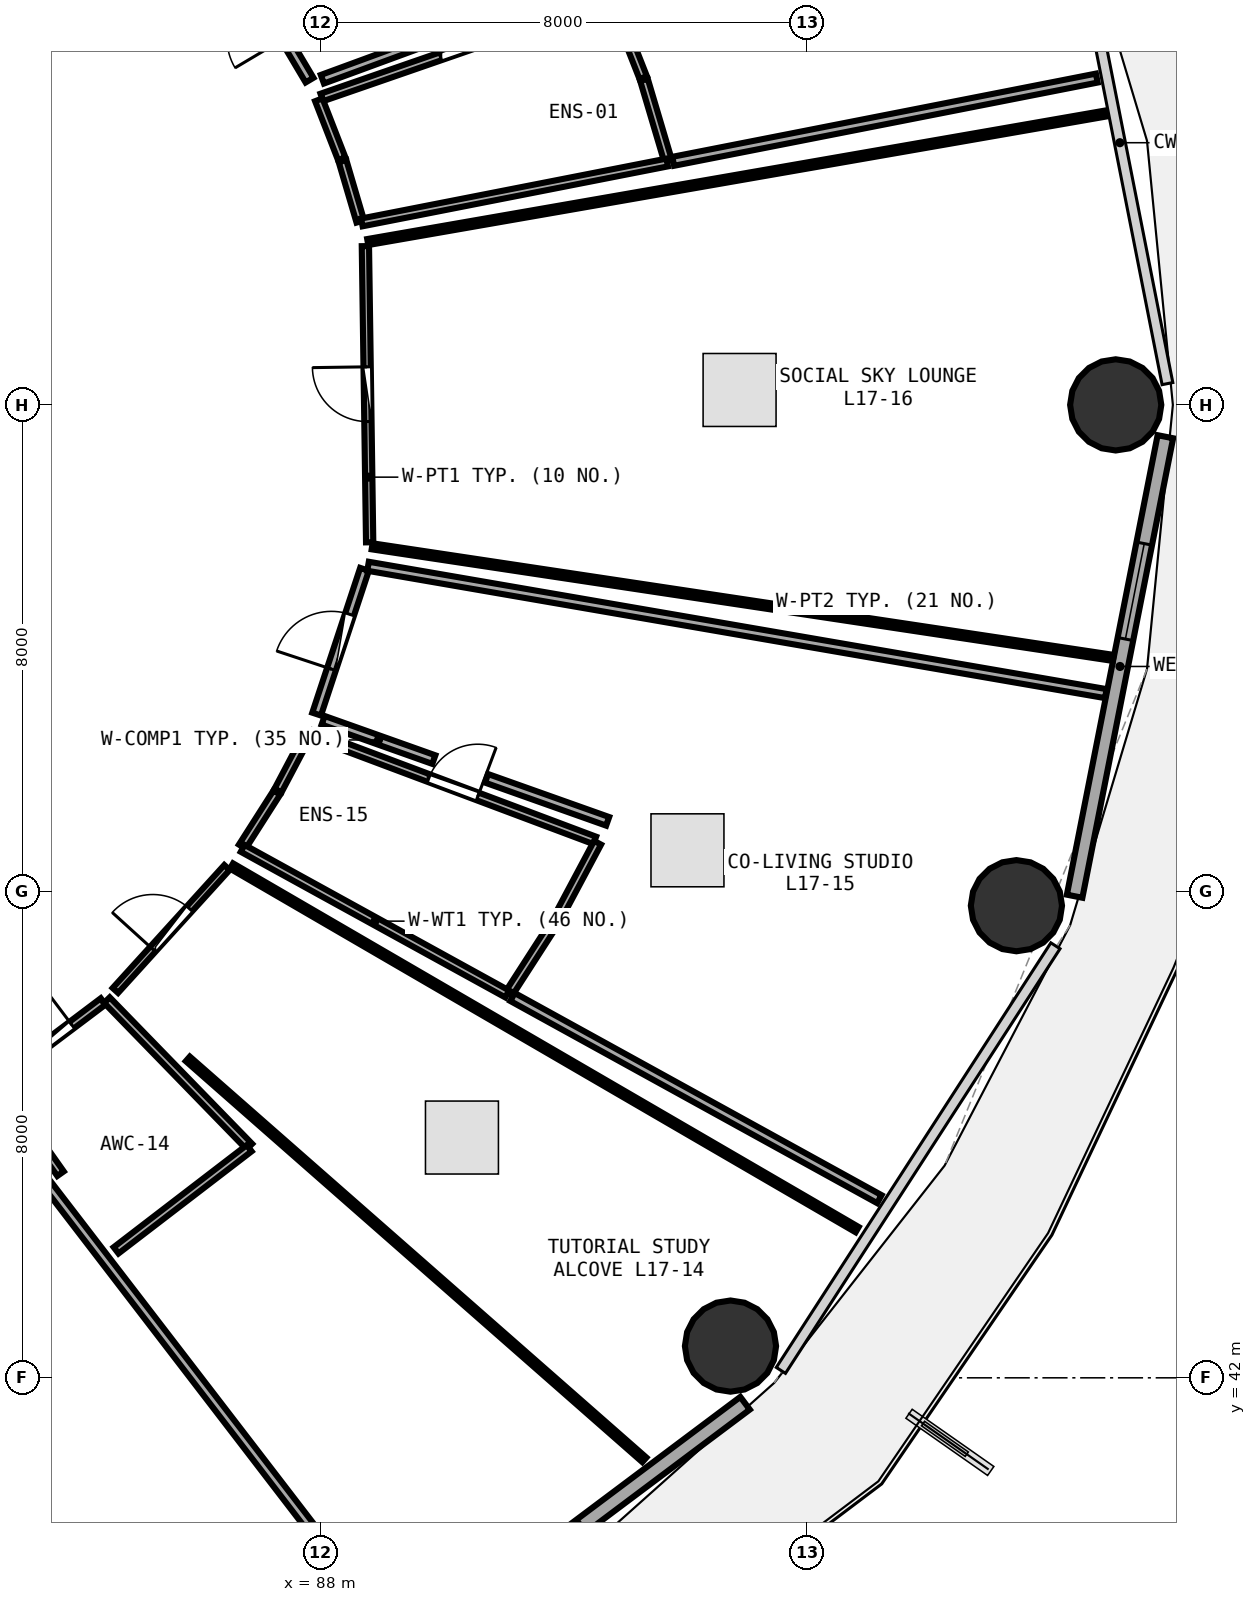
"""IFC4 building model, lengths in metres.
Left out: names, types, materials, properties, quantities, classifications, styles, units other than length and angle.
Written with IfcOpenShell. Run it as: python <this file> out.ifc"""

import sys

from ifc_helpers import new_model, si_unit, direction, frame, frame_2d, origin, origin_2d, place, context, subcontext, project, spatial, rectangle, circle, extrude, element, fill, save


model = new_model("IFC4")
c1 = context("Model", 3, precision=1e-05, world=origin(), true_north=direction((0.0, 1.0)))
c2 = subcontext(c1, "Body", "Model", "MODEL_VIEW")
j1 = project(units=[si_unit("LENGTHUNIT", "METRE"), si_unit("PLANEANGLEUNIT", "RADIAN")], contexts=[c1])
p1 = place(None, origin())
s1 = spatial("IfcSite", under=j1, at=p1, CompositionType="ELEMENT")
p2 = place(p1, origin())
s2 = spatial("IfcBuilding", under=s1, at=p2, CompositionType="ELEMENT")
p3 = place(p2, frame((0.0, 0.0, 67.5)))
s3 = spatial("IfcBuildingStorey", under=s2, at=p3, CompositionType="ELEMENT", Elevation=67.5)
for number, where, z_axis, x_axis in (
    (1, (101.08, 58.0, 0.0), (0.0, 0.0, 1.0), (1.0, 0.0, 0.0)),
    (2, (94.744, 42.522, 0.0), (0.0, 0.0, 1.0), (1.0, 0.0, 0.0)),
    (3, (99.447, 49.764, 0.0), (0.0, 0.0, 1.0), (1.0, 0.0, 0.0)),
):
    element("IfcColumn", number, at=place(p3, frame(where, z_axis=z_axis, x_axis=x_axis)), inside=s3, PredefinedType="COLUMN", context=c2, shape_type="SweptSolid", body=[
        extrude(circle(Radius=0.75, at=origin_2d()), origin(), (0.0, 0.0, 1.0), 4.76),
    ])
p4 = place(p3, frame((88.349, 36.611, 0.0), z_axis=(0.0, 0.0, 1.0), x_axis=(0.80030733173, 0.599590005569, 0.0)))
e4 = element("IfcWall", 4, at=p4, inside=s3, PredefinedType="SOLIDWALL", context=c2, shape_type="SweptSolid", body=[
    extrude(rectangle(XDim=8.291, YDim=0.26, at=frame_2d((4.145, 0.0))), origin(), (0.0, 0.0, 1.0), 4.345),
])
p5 = place(p4, frame((3.345, 0.0, 0.85)))
e5 = element("IfcOpeningElement", 5, at=p5, cuts=e4, PredefinedType="OPENING", context=c2, shape_type="SweptSolid", body=[
    extrude(rectangle(XDim=1.6, YDim=1.45, at=frame_2d((0.8, 0.725))), frame((0.0, 0.14, 0.0), z_axis=(0.0, -1.0, 0.0), x_axis=(1.0, 0.0, 0.0)), (0.0, 0.0, 1.0), 0.28),
])
p6 = place(p3, frame((100.404, 49.92, 0.0), z_axis=(0.0, 0.0, 1.0), x_axis=(0.193726159581, 0.98105564322, 0.0)))
e6 = element("IfcWall", 6, at=p6, inside=s3, PredefinedType="SOLIDWALL", context=c2, shape_type="SweptSolid", body=[
    extrude(rectangle(XDim=7.703, YDim=0.26, at=frame_2d((3.851, 0.0))), origin(), (0.0, 0.0, 1.0), 4.345),
])
p7 = place(p6, frame((4.311, 0.0, 0.85)))
e7 = element("IfcOpeningElement", 7, at=p7, cuts=e6, PredefinedType="OPENING", context=c2, shape_type="SweptSolid", body=[
    extrude(rectangle(XDim=1.6, YDim=1.45, at=frame_2d((0.8, 0.725))), frame((0.0, 0.14, 0.0), z_axis=(0.0, -1.0, 0.0), x_axis=(1.0, 0.0, 0.0)), (0.0, 0.0, 1.0), 0.28),
])
p8 = place(p3, frame((88.023, 63.056, 0.0), z_axis=(0.0, 0.0, 1.0), x_axis=(0.945000053877, 0.327070173163, 0.0)))
e8 = element("IfcWall", 8, at=p8, inside=s3, PredefinedType="PLUMBINGWALL", context=c2, shape_type="SweptSolid", body=[
    extrude(rectangle(XDim=4.982, YDim=0.13, at=frame_2d((2.491, 0.0))), origin(), (0.0, 0.0, 1.0), 4.045),
])
p9 = place(p8, frame((2.061, 0.0, 0.0)))
e9 = element("IfcOpeningElement", 9, at=p9, cuts=e8, PredefinedType="OPENING", context=c2, shape_type="SweptSolid", body=[
    extrude(rectangle(XDim=0.86, YDim=2.05, at=frame_2d((0.43, 1.025))), frame((0.0, 0.075, 0.0), z_axis=(0.0, -1.0, 0.0), x_axis=(1.0, 0.0, 0.0)), (0.0, 0.0, 1.0), 0.15),
])
p10 = place(p3, frame((87.821, 63.341, 0.0), z_axis=(0.0, 0.0, 1.0), x_axis=(-0.510684908265, 0.859767948036, 0.0)))
e10 = element("IfcWall", 10, at=p10, inside=s3, PredefinedType="PARTITIONING", context=c2, shape_type="SweptSolid", body=[
    extrude(rectangle(XDim=2.547, YDim=0.15, at=frame_2d((1.273, 0.0))), origin(), (0.0, 0.0, 1.0), 2.345),
])
p11 = place(p10, frame((0.799, 0.0, 0.0)))
e11 = element("IfcOpeningElement", 11, at=p11, cuts=e10, PredefinedType="OPENING", context=c2, shape_type="SweptSolid", body=[
    extrude(rectangle(XDim=0.95, YDim=2.08, at=frame_2d((0.475, 1.04))), frame((0.0, 0.085, 0.0), z_axis=(0.0, -1.0, 0.0), x_axis=(1.0, 0.0, 0.0)), (0.0, 0.0, 1.0), 0.17),
])
p12 = place(p3, frame((82.712, 46.898, 0.0), z_axis=(0.0, 0.0, 1.0), x_axis=(0.798783982359, 0.601617943155, 0.0)))
e12 = element("IfcWall", 12, at=p12, inside=s3, PredefinedType="PLUMBINGWALL", context=c2, shape_type="SweptSolid", body=[
    extrude(rectangle(XDim=2.147, YDim=0.13, at=frame_2d((1.074, 0.0))), origin(), (0.0, 0.0, 1.0), 2.345),
])
p13 = place(p12, frame((0.644, 0.0, 0.0)))
e13 = element("IfcOpeningElement", 13, at=p13, cuts=e12, PredefinedType="OPENING", context=c2, shape_type="SweptSolid", body=[
    extrude(rectangle(XDim=0.86, YDim=2.05, at=frame_2d((0.43, 1.025))), frame((0.0, 0.075, 0.0), z_axis=(0.0, -1.0, 0.0), x_axis=(1.0, 0.0, 0.0)), (0.0, 0.0, 1.0), 0.15),
])
p14 = place(p3, frame((84.628, 48.37, 0.0), z_axis=(0.0, 0.0, 1.0), x_axis=(0.672036212067, 0.740518284495, 0.0)))
e14 = element("IfcWall", 14, at=p14, inside=s3, PredefinedType="PARTITIONING", context=c2, shape_type="SweptSolid", body=[
    extrude(rectangle(XDim=2.731, YDim=0.12, at=frame_2d((1.365, 0.0))), origin(), (0.0, 0.0, 1.0), 2.345),
])
p15 = place(p14, frame((0.915, 0.0, 0.0)))
e15 = element("IfcOpeningElement", 15, at=p15, cuts=e14, PredefinedType="OPENING", context=c2, shape_type="SweptSolid", body=[
    extrude(rectangle(XDim=0.9, YDim=2.08, at=frame_2d((0.45, 1.04))), frame((0.0, 0.07, 0.0), z_axis=(0.0, -1.0, 0.0), x_axis=(1.0, 0.0, 0.0)), (0.0, 0.0, 1.0), 0.14),
])
p16 = place(p3, frame((87.859, 52.584, 0.0), z_axis=(0.0, 0.0, 1.0), x_axis=(0.93625445313, -0.351322642301, 0.0)))
e16 = element("IfcWall", 16, at=p16, inside=s3, PredefinedType="PLUMBINGWALL", context=c2, shape_type="SweptSolid", body=[
    extrude(rectangle(XDim=4.969, YDim=0.13, at=frame_2d((2.485, 0.0))), origin(), (0.0, 0.0, 1.0), 2.345),
])
p17 = place(p16, frame((2.055, 0.0, 0.0)))
e17 = element("IfcOpeningElement", 17, at=p17, cuts=e16, PredefinedType="OPENING", context=c2, shape_type="SweptSolid", body=[
    extrude(rectangle(XDim=0.86, YDim=2.05, at=frame_2d((0.43, 1.025))), frame((0.0, 0.075, 0.0), z_axis=(0.0, -1.0, 0.0), x_axis=(1.0, 0.0, 0.0)), (0.0, 0.0, 1.0), 0.15),
])
p18 = place(p3, frame((87.938, 52.915, 0.0), z_axis=(0.0, 0.0, 1.0), x_axis=(0.313977919329, 0.949430285052, 0.0)))
e18 = element("IfcWall", 18, at=p18, inside=s3, PredefinedType="PARTITIONING", context=c2, shape_type="SweptSolid", body=[
    extrude(rectangle(XDim=2.508, YDim=0.15, at=frame_2d((1.254, 0.0))), origin(), (0.0, 0.0, 1.0), 4.105),
])
p19 = place(p18, frame((0.779, 0.0, 0.0)))
e19 = element("IfcOpeningElement", 19, at=p19, cuts=e18, PredefinedType="OPENING", context=c2, shape_type="SweptSolid", body=[
    extrude(rectangle(XDim=0.95, YDim=2.08, at=frame_2d((0.475, 1.04))), frame((0.0, 0.085, 0.0), z_axis=(0.0, -1.0, 0.0), x_axis=(1.0, 0.0, 0.0)), (0.0, 0.0, 1.0), 0.17),
])
p20 = place(p3, frame((88.81, 55.74, 0.0), z_axis=(0.0, 0.0, 1.0), x_axis=(-0.014383034903, 0.999896558803, 0.0)))
e20 = element("IfcWall", 20, at=p20, inside=s3, PredefinedType="PARTITIONING", context=c2, shape_type="SweptSolid", body=[
    extrude(rectangle(XDim=4.872, YDim=0.12, at=frame_2d((2.436, 0.0))), origin(), (0.0, 0.0, 1.0), 2.345),
])
p21 = place(p20, frame((1.986, 0.0, 0.0)))
e21 = element("IfcOpeningElement", 21, at=p21, cuts=e20, PredefinedType="OPENING", context=c2, shape_type="SweptSolid", body=[
    extrude(rectangle(XDim=0.9, YDim=2.08, at=frame_2d((0.45, 1.04))), frame((0.0, 0.07, 0.0), z_axis=(0.0, -1.0, 0.0), x_axis=(1.0, 0.0, 0.0)), (0.0, 0.0, 1.0), 0.14),
])
p22 = place(p3, frame((88.656, 61.016, 0.0), z_axis=(0.0, 0.0, 1.0), x_axis=(-0.282370492218, 0.959305428487, 0.0)))
e22 = element("IfcWall", 22, at=p22, inside=s3, PredefinedType="PLUMBINGWALL", context=c2, shape_type="SweptSolid", body=[
    extrude(rectangle(XDim=1.036, YDim=0.13, at=frame_2d((0.518, 0.0))), origin(), (0.0, 0.0, 1.0), 4.35),
])
p23 = place(p3, frame((88.351, 62.048, 0.0), z_axis=(0.0, 0.0, 1.0), x_axis=(-0.362514197989, 0.931978248811, 0.0)))
e23 = element("IfcWall", 23, at=p23, inside=s3, PredefinedType="PLUMBINGWALL", context=c2, shape_type="SweptSolid", body=[
    extrude(rectangle(XDim=1.041, YDim=0.13, at=frame_2d((0.52, 0.0))), origin(), (0.0, 0.0, 1.0), 4.105),
])
p24 = place(p3, frame((92.795, 64.686, 0.0), z_axis=(0.0, 0.0, 1.0), x_axis=(0.366277671592, -0.930505597669, 0.0)))
e24 = element("IfcWall", 24, at=p24, inside=s3, PredefinedType="PLUMBINGWALL", context=c2, shape_type="SweptSolid", body=[
    extrude(rectangle(XDim=1.401, YDim=0.13, at=frame_2d((0.701, 0.0))), origin(), (0.0, 0.0, 1.0), 4.35),
])
p25 = place(p3, frame((93.322, 63.345, 0.0), z_axis=(0.0, 0.0, 1.0), x_axis=(0.284613387728, -0.958642383543, 0.0)))
e25 = element("IfcWall", 25, at=p25, inside=s3, PredefinedType="PLUMBINGWALL", context=c2, shape_type="SweptSolid", body=[
    extrude(rectangle(XDim=1.393, YDim=0.13, at=frame_2d((0.697, 0.0))), origin(), (0.0, 0.0, 1.0), 4.35),
])
p26 = place(p3, frame((93.704, 61.986, 0.0), z_axis=(0.0, 0.0, 1.0), x_axis=(-0.981295026007, -0.192509926844, 0.0)))
e26 = element("IfcWall", 26, at=p26, inside=s3, PredefinedType="PLUMBINGWALL", context=c2, shape_type="SweptSolid", body=[
    extrude(rectangle(XDim=5.118, YDim=0.13, at=frame_2d((2.559, 0.0))), origin(), (0.0, 0.0, 1.0), 4.045),
])
p27 = place(p3, frame((100.769, 63.374, 0.0), z_axis=(0.0, 0.0, 1.0), x_axis=(-0.98124289703, -0.192775457535, 0.0)))
e27 = element("IfcWall", 27, at=p27, inside=s3, PredefinedType="PARTITIONING", context=c2, shape_type="SweptSolid", body=[
    extrude(rectangle(XDim=7.1, YDim=0.15, at=frame_2d((3.55, 0.0))), origin(), (0.0, 0.0, 1.0), 2.345),
])
p28 = place(p3, frame((89.839, 64.018, 0.0), z_axis=(0.0, 0.0, 1.0), x_axis=(-0.938736795894, -0.344634919931, 0.0)))
e28 = element("IfcWall", 28, at=p28, inside=s3, PredefinedType="PARTITIONING", context=c2, shape_type="SweptSolid", body=[
    extrude(rectangle(XDim=1.924, YDim=0.15, at=frame_2d((0.962, 0.0))), origin(), (0.0, 0.0, 1.0), 4.105),
])
p29 = place(p3, frame((82.385, 46.642, 0.0), z_axis=(0.0, 0.0, 1.0), x_axis=(0.6091849282, -0.793028198271, 0.0)))
e29 = element("IfcWall", 29, at=p29, inside=s3, PredefinedType="PARTITIONING", context=c2, shape_type="SweptSolid", body=[
    extrude(rectangle(XDim=11.289, YDim=0.15, at=frame_2d((5.645, 0.0))), origin(), (0.0, 0.0, 1.0), 2.345),
])
p30 = place(p3, frame((84.489, 48.212, 0.0), z_axis=(0.0, 0.0, 1.0), x_axis=(0.697008873448, -0.717062500996, 0.0)))
e30 = element("IfcWall", 30, at=p30, inside=s3, PredefinedType="PLUMBINGWALL", context=c2, shape_type="SweptSolid", body=[
    extrude(rectangle(XDim=3.36, YDim=0.13, at=frame_2d((1.68, 0.0))), origin(), (0.0, 0.0, 1.0), 4.105),
])
p31 = place(p3, frame((86.829, 45.776, 0.0), z_axis=(0.0, 0.0, 1.0), x_axis=(-0.793379880103, -0.608726840092, 0.0)))
e31 = element("IfcWall", 31, at=p31, inside=s3, PredefinedType="PLUMBINGWALL", context=c2, shape_type="SweptSolid", body=[
    extrude(rectangle(XDim=2.759, YDim=0.13, at=frame_2d((1.38, 0.0))), origin(), (0.0, 0.0, 1.0), 2.345),
])
p32 = place(p3, frame((83.726, 45.357, 0.0), z_axis=(0.0, 0.0, 1.0), x_axis=(-0.576488563642, 0.817105217209, 0.0)))
e32 = element("IfcWall", 32, at=p32, inside=s3, PredefinedType="PLUMBINGWALL", context=c2, shape_type="SweptSolid", body=[
    extrude(rectangle(XDim=1.822, YDim=0.13, at=frame_2d((0.911, 0.0))), origin(), (0.0, 0.0, 1.0), 2.345),
])
p33 = place(p3, frame((86.539, 50.417, 0.0), z_axis=(0.0, 0.0, 1.0), x_axis=(0.864576212426, -0.502501714333, 0.0)))
e33 = element("IfcWall", 33, at=p33, inside=s3, PredefinedType="PARTITIONING", context=c2, shape_type="SweptSolid", body=[
    extrude(rectangle(XDim=11.9, YDim=0.1, at=frame_2d((5.95, 0.0))), origin(), (0.0, 0.0, 1.0), 2.345),
])
p34 = place(p3, frame((93.328, 40.651, 0.0), z_axis=(0.0, 0.0, 1.0), x_axis=(-0.751420724703, 0.659823381282, 0.0)))
e34 = element("IfcWall", 34, at=p34, inside=s3, PredefinedType="PARTITIONING", context=c2, shape_type="SweptSolid", body=[
    extrude(rectangle(XDim=9.992, YDim=0.1, at=frame_2d((4.996, 0.0))), origin(), (0.0, 0.0, 1.0), 2.345),
])
p35 = place(p3, frame((86.715, 50.734, 0.0), z_axis=(0.0, 0.0, 1.0), x_axis=(0.53816125517, 0.842841897057, 0.0)))
e35 = element("IfcWall", 35, at=p35, inside=s3, PredefinedType="PLUMBINGWALL", context=c2, shape_type="SweptSolid", body=[
    extrude(rectangle(XDim=1.056, YDim=0.13, at=frame_2d((0.528, 0.0))), origin(), (0.0, 0.0, 1.0), 2.345),
])
p36 = place(p3, frame((87.303, 51.659, 0.0), z_axis=(0.0, 0.0, 1.0), x_axis=(0.467001016817, 0.884256778482, 0.0)))
e36 = element("IfcWall", 36, at=p36, inside=s3, PredefinedType="PLUMBINGWALL", context=c2, shape_type="SweptSolid", body=[
    extrude(rectangle(XDim=1.05, YDim=0.13, at=frame_2d((0.525, 0.0))), origin(), (0.0, 0.0, 1.0), 4.105),
])
p37 = place(p3, frame((92.559, 50.799, 0.0), z_axis=(0.0, 0.0, 1.0), x_axis=(-0.470471737127, -0.882415063654, 0.0)))
e37 = element("IfcWall", 37, at=p37, inside=s3, PredefinedType="PLUMBINGWALL", context=c2, shape_type="SweptSolid", body=[
    extrude(rectangle(XDim=1.414, YDim=0.13, at=frame_2d((0.707, 0.0))), origin(), (0.0, 0.0, 1.0), 2.345),
])
p38 = place(p3, frame((91.873, 49.517, 0.0), z_axis=(0.0, 0.0, 1.0), x_axis=(-0.542142481081, -0.840286576239, 0.0)))
e38 = element("IfcWall", 38, at=p38, inside=s3, PredefinedType="PLUMBINGWALL", context=c2, shape_type="SweptSolid", body=[
    extrude(rectangle(XDim=1.425, YDim=0.13, at=frame_2d((0.712, 0.0))), origin(), (0.0, 0.0, 1.0), 4.35),
])
p39 = place(p3, frame((91.073, 48.312, 0.0), z_axis=(0.0, 0.0, 1.0), x_axis=(-0.87605188001, 0.48221686359, 0.0)))
e39 = element("IfcWall", 39, at=p39, inside=s3, PredefinedType="PLUMBINGWALL", context=c2, shape_type="SweptSolid", body=[
    extrude(rectangle(XDim=4.967, YDim=0.13, at=frame_2d((2.483, 0.0))), origin(), (0.0, 0.0, 1.0), 2.345),
])
p40 = place(p3, frame((88.783, 55.346, 0.0), z_axis=(0.0, 0.0, 1.0), x_axis=(0.985427357527, -0.170096804898, 0.0)))
e40 = element("IfcWall", 40, at=p40, inside=s3, PredefinedType="PARTITIONING", context=c2, shape_type="SweptSolid", body=[
    extrude(rectangle(XDim=12.313, YDim=0.15, at=frame_2d((6.157, 0.0))), origin(), (0.0, 0.0, 1.0), 2.345),
])
p41 = place(p3, frame((97.193, 44.938, 0.0), z_axis=(0.0, 0.0, 1.0), x_axis=(-0.875868518132, 0.482549830531, 0.0)))
e41 = element("IfcWall", 41, at=p41, inside=s3, PredefinedType="PARTITIONING", context=c2, shape_type="SweptSolid", body=[
    extrude(rectangle(XDim=6.889, YDim=0.15, at=frame_2d((3.445, 0.0))), origin(), (0.0, 0.0, 1.0), 2.345),
])
p42 = place(p3, frame((92.724, 51.151, 0.0), z_axis=(0.0, 0.0, 1.0), x_axis=(-0.942346688621, 0.334638190357, 0.0)))
e42 = element("IfcWall", 42, at=p42, inside=s3, PredefinedType="PARTITIONING", context=c2, shape_type="SweptSolid", body=[
    extrude(rectangle(XDim=2.114, YDim=0.15, at=frame_2d((1.057, 0.0))), origin(), (0.0, 0.0, 1.0), 4.045),
])
p43 = place(p3, frame((89.865, 52.167, 0.0), z_axis=(0.0, 0.0, 1.0), x_axis=(-0.942335197554, 0.334670547629, 0.0)))
e43 = element("IfcWall", 43, at=p43, inside=s3, PredefinedType="PARTITIONING", context=c2, shape_type="SweptSolid", body=[
    extrude(rectangle(XDim=1.932, YDim=0.15, at=frame_2d((0.966, 0.0))), origin(), (0.0, 0.0, 1.0), 4.105),
])
p44 = place(p3, frame((88.778, 60.678, 0.0), z_axis=(0.0, 0.0, 1.0), x_axis=(0.985176076522, 0.171546198583, 0.0)))
e44 = element("IfcWall", 44, at=p44, inside=s3, PredefinedType="PARTITIONING", context=c2, shape_type="SweptSolid", body=[
    extrude(rectangle(XDim=12.312, YDim=0.1, at=frame_2d((6.156, 0.0))), origin(), (0.0, 0.0, 1.0), 2.345),
])
p45 = place(p3, frame((101.039, 53.839, 0.0), z_axis=(0.0, 0.0, 1.0), x_axis=(-0.988857033015, 0.14886829164, 0.0)))
e45 = element("IfcWall", 45, at=p45, inside=s3, PredefinedType="PARTITIONING", context=c2, shape_type="SweptSolid", body=[
    extrude(rectangle(XDim=12.326, YDim=0.1, at=frame_2d((6.163, 0.0))), origin(), (0.0, 0.0, 1.0), 2.345),
])
p46 = place(p7, origin())
e46 = element("IfcWindow", 46, at=p46, inside=s3, PartitioningType="SINGLE_PANEL", PredefinedType="WINDOW", context=c2, shape_type="SweptSolid", body=[
    extrude(rectangle(XDim=1.6, YDim=1.45, at=frame_2d((0.8, 0.725))), frame((0.0, 0.03, 0.0), z_axis=(0.0, -1.0, 0.0), x_axis=(1.0, 0.0, 0.0)), (0.0, 0.0, 1.0), 0.06),
])
fill(e7, e46)
p47 = place(p9, origin())
e47 = element("IfcDoor", 47, at=p47, inside=s3, OperationType="SINGLE_SWING_RIGHT", PredefinedType="DOOR", context=c2, shape_type="SweptSolid", body=[
    extrude(rectangle(XDim=0.86, YDim=2.05, at=frame_2d((0.43, 1.025))), frame((0.0, 0.025, 0.0), z_axis=(0.0, -1.0, 0.0), x_axis=(1.0, 0.0, 0.0)), (0.0, 0.0, 1.0), 0.05),
])
fill(e9, e47)
p48 = place(p13, origin())
e48 = element("IfcDoor", 48, at=p48, inside=s3, OperationType="SINGLE_SWING_RIGHT", PredefinedType="DOOR", context=c2, shape_type="SweptSolid", body=[
    extrude(rectangle(XDim=0.86, YDim=2.05, at=frame_2d((0.43, 1.025))), frame((0.0, 0.025, 0.0), z_axis=(0.0, -1.0, 0.0), x_axis=(1.0, 0.0, 0.0)), (0.0, 0.0, 1.0), 0.05),
])
fill(e13, e48)
p49 = place(p15, origin())
e49 = element("IfcDoor", 49, at=p49, inside=s3, OperationType="SINGLE_SWING_LEFT", PredefinedType="DOOR", context=c2, shape_type="SweptSolid", body=[
    extrude(rectangle(XDim=0.9, YDim=2.08, at=frame_2d((0.45, 1.04))), frame((0.0, 0.025, 0.0), z_axis=(0.0, -1.0, 0.0), x_axis=(1.0, 0.0, 0.0)), (0.0, 0.0, 1.0), 0.05),
])
fill(e15, e49)
p50 = place(p17, origin())
e50 = element("IfcDoor", 50, at=p50, inside=s3, OperationType="SINGLE_SWING_RIGHT", PredefinedType="DOOR", context=c2, shape_type="SweptSolid", body=[
    extrude(rectangle(XDim=0.86, YDim=2.05, at=frame_2d((0.43, 1.025))), frame((0.0, 0.025, 0.0), z_axis=(0.0, -1.0, 0.0), x_axis=(1.0, 0.0, 0.0)), (0.0, 0.0, 1.0), 0.05),
])
fill(e17, e50)
p51 = place(p19, origin())
e51 = element("IfcDoor", 51, at=p51, inside=s3, OperationType="SINGLE_SWING_LEFT", PredefinedType="DOOR", context=c2, shape_type="SweptSolid", body=[
    extrude(rectangle(XDim=0.95, YDim=2.08, at=frame_2d((0.475, 1.04))), frame((0.0, 0.025, 0.0), z_axis=(0.0, -1.0, 0.0), x_axis=(1.0, 0.0, 0.0)), (0.0, 0.0, 1.0), 0.05),
])
fill(e19, e51)
p52 = place(p21, origin())
e52 = element("IfcDoor", 52, at=p52, inside=s3, OperationType="SINGLE_SWING_RIGHT", PredefinedType="DOOR", context=c2, shape_type="SweptSolid", body=[
    extrude(rectangle(XDim=0.9, YDim=2.08, at=frame_2d((0.45, 1.04))), frame((0.0, 0.025, 0.0), z_axis=(0.0, -1.0, 0.0), x_axis=(1.0, 0.0, 0.0)), (0.0, 0.0, 1.0), 0.05),
])
fill(e21, e52)
save(model, sys.argv[1])
